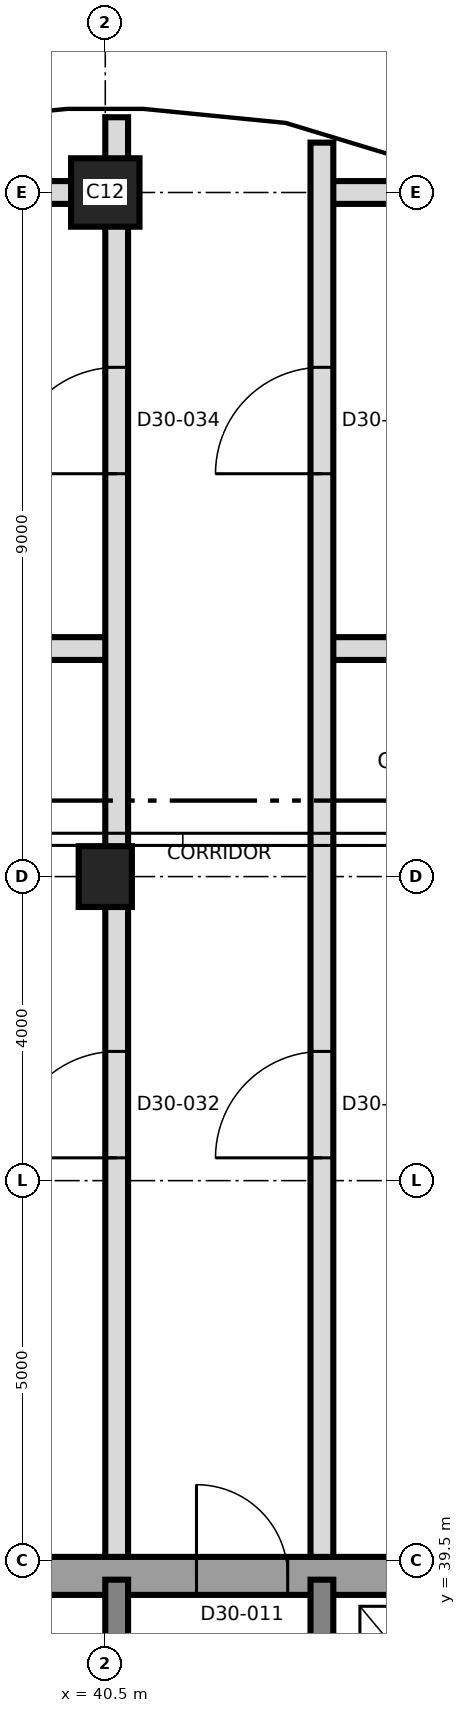
"""IFC4 building model, lengths in metres.
Left out: names, types, materials, properties, quantities, classifications, styles, units other than length and angle.
Written with IfcOpenShell. Run it as: python <this file> out.ifc"""

import sys

from ifc_helpers import new_model, si_unit, direction, frame, frame_2d, origin, origin_2d, place, context, subcontext, project, spatial, rectangle, extrude, element, fill, save


model = new_model("IFC4")
c1 = context("Model", 3, precision=1e-05, world=origin(), true_north=direction((0.0, 1.0)))
c2 = subcontext(c1, "Body", "Model", "MODEL_VIEW")
j1 = project(units=[si_unit("LENGTHUNIT", "METRE"), si_unit("PLANEANGLEUNIT", "RADIAN")], contexts=[c1])
p1 = place(None, origin())
s1 = spatial("IfcSite", under=j1, at=p1, CompositionType="ELEMENT")
p2 = place(p1, origin())
s2 = spatial("IfcBuilding", under=s1, at=p2, CompositionType="ELEMENT")
p3 = place(p2, frame((0.0, 0.0, 260.9)))
s3 = spatial("IfcBuildingStorey", under=s2, at=p3, CompositionType="ELEMENT", Elevation=260.9)
p4 = place(p3, frame((31.25, 39.3, 0.0), z_axis=(0.0, 0.0, 1.0), x_axis=(1.0, 0.0, 0.0)))
e1 = element("IfcWall", 1, at=p4, inside=s3, PredefinedType="SHEAR", context=c2, shape_type="SweptSolid", body=[
    extrude(rectangle(XDim=27.0, YDim=0.5, at=frame_2d((13.5, 0.0))), origin(), (0.0, 0.0, 1.0), 6.0),
])
p5 = place(p4, frame((10.45, 0.0, 0.0)))
e2 = element("IfcOpeningElement", 2, at=p5, cuts=e1, PredefinedType="OPENING", context=c2, shape_type="SweptSolid", body=[
    extrude(rectangle(XDim=1.2, YDim=2.1, at=frame_2d((0.6, 1.05))), frame((0.0, 0.26, 0.0), z_axis=(0.0, -1.0, 0.0), x_axis=(1.0, 0.0, 0.0)), (0.0, 0.0, 1.0), 0.52),
])
for number, where, z_axis, x_axis in (
    (3, (40.65, 33.5, 0.0), (0.0, 0.0, 1.0), (0.0, 1.0, 0.0)),
    (4, (43.35, 33.5, 0.0), (0.0, 0.0, 1.0), (0.0, 1.0, 0.0)),
):
    element("IfcWall", number, at=place(p3, frame(where, z_axis=z_axis, x_axis=x_axis)), inside=s3, PredefinedType="SHEAR", context=c2, shape_type="SweptSolid", body=[
        extrude(rectangle(XDim=5.75, YDim=0.3, at=frame_2d((2.875, 0.0))), origin(), (0.0, 0.0, 1.0), 6.0),
    ])
p6 = place(p3, frame((40.5, 48.5, 0.0), z_axis=(0.0, 0.0, 1.0), x_axis=(0.0, 1.0, 0.0)))
e5 = element("IfcColumn", 5, at=p6, inside=s3, PredefinedType="COLUMN", context=c2, shape_type="SweptSolid", body=[
    extrude(rectangle(XDim=0.8, YDim=0.7, at=origin_2d()), origin(), (0.0, 0.0, 1.0), 6.0),
])
p7 = place(p3, frame((40.5, 57.5, 0.0), z_axis=(0.0, 0.0, 1.0), x_axis=(1.0, 0.0, 0.0)))
e6 = element("IfcColumn", 6, at=p7, inside=s3, PredefinedType="COLUMN", context=c2, shape_type="SweptSolid", body=[
    extrude(rectangle(XDim=0.9, YDim=0.9, at=origin_2d()), origin(), (0.0, 0.0, 1.0), 6.0),
])
p8 = place(p3, frame((30.889, 51.5, 0.0), z_axis=(0.0, 0.0, 1.0), x_axis=(1.0, 0.0, 0.0)))
e7 = element("IfcWall", 7, at=p8, inside=s3, PredefinedType="PARTITIONING", context=c2, shape_type="SweptSolid", body=[
    extrude(rectangle(XDim=9.761, YDim=0.3, at=frame_2d((4.88, 0.0))), origin(), (0.0, 0.0, 1.0), 5.65),
])
p9 = place(p3, frame((43.35, 51.5, 0.0), z_axis=(0.0, 0.0, 1.0), x_axis=(1.0, 0.0, 0.0)))
e8 = element("IfcWall", 8, at=p9, inside=s3, PredefinedType="PARTITIONING", context=c2, shape_type="SweptSolid", body=[
    extrude(rectangle(XDim=6.761, YDim=0.3, at=frame_2d((3.38, 0.0))), origin(), (0.0, 0.0, 1.0), 5.65),
])
p10 = place(p3, frame((35.858, 57.5, 0.0), z_axis=(0.0, 0.0, 1.0), x_axis=(1.0, 0.0, 0.0)))
e9 = element("IfcWall", 9, at=p10, inside=s3, PredefinedType="PARTITIONING", context=c2, shape_type="SweptSolid", body=[
    extrude(rectangle(XDim=4.792, YDim=0.3, at=frame_2d((2.396, 0.0))), origin(), (0.0, 0.0, 1.0), 5.65),
])
p11 = place(p3, frame((43.35, 57.5, 0.0), z_axis=(0.0, 0.0, 1.0), x_axis=(1.0, 0.0, 0.0)))
e10 = element("IfcWall", 10, at=p11, inside=s3, PredefinedType="PARTITIONING", context=c2, shape_type="SweptSolid", body=[
    extrude(rectangle(XDim=1.792, YDim=0.3, at=frame_2d((0.896, 0.0))), origin(), (0.0, 0.0, 1.0), 5.65),
])
p12 = place(p3, frame((40.65, 39.55, 0.0), z_axis=(0.0, 0.0, 1.0), x_axis=(0.0, 1.0, 0.0)))
e11 = element("IfcWall", 11, at=p12, inside=s3, PredefinedType="PARTITIONING", context=c2, shape_type="SweptSolid", body=[
    extrude(rectangle(XDim=18.94, YDim=0.3, at=frame_2d((9.47, 0.0))), origin(), (0.0, 0.0, 1.0), 5.65),
])
p13 = place(p12, frame((5.25, 0.0, 0.0)))
e12 = element("IfcOpeningElement", 12, at=p13, cuts=e11, PredefinedType="OPENING", context=c2, shape_type="SweptSolid", body=[
    extrude(rectangle(XDim=1.4, YDim=2.1, at=frame_2d((0.7, 1.05))), frame((0.0, 0.16, 0.0), z_axis=(0.0, -1.0, 0.0), x_axis=(1.0, 0.0, 0.0)), (0.0, 0.0, 1.0), 0.32),
])
p14 = place(p12, frame((14.25, 0.0, 0.0)))
e13 = element("IfcOpeningElement", 13, at=p14, cuts=e11, PredefinedType="OPENING", context=c2, shape_type="SweptSolid", body=[
    extrude(rectangle(XDim=1.4, YDim=2.1, at=frame_2d((0.7, 1.05))), frame((0.0, 0.16, 0.0), z_axis=(0.0, -1.0, 0.0), x_axis=(1.0, 0.0, 0.0)), (0.0, 0.0, 1.0), 0.32),
])
p15 = place(p3, frame((43.35, 39.55, 0.0), z_axis=(0.0, 0.0, 1.0), x_axis=(0.0, 1.0, 0.0)))
e14 = element("IfcWall", 14, at=p15, inside=s3, PredefinedType="PARTITIONING", context=c2, shape_type="SweptSolid", body=[
    extrude(rectangle(XDim=18.606, YDim=0.3, at=frame_2d((9.303, 0.0))), origin(), (0.0, 0.0, 1.0), 5.65),
])
p16 = place(p15, frame((5.25, 0.0, 0.0)))
e15 = element("IfcOpeningElement", 15, at=p16, cuts=e14, PredefinedType="OPENING", context=c2, shape_type="SweptSolid", body=[
    extrude(rectangle(XDim=1.4, YDim=2.1, at=frame_2d((0.7, 1.05))), frame((0.0, 0.16, 0.0), z_axis=(0.0, -1.0, 0.0), x_axis=(1.0, 0.0, 0.0)), (0.0, 0.0, 1.0), 0.32),
])
p17 = place(p15, frame((14.25, 0.0, 0.0)))
e16 = element("IfcOpeningElement", 16, at=p17, cuts=e14, PredefinedType="OPENING", context=c2, shape_type="SweptSolid", body=[
    extrude(rectangle(XDim=1.4, YDim=2.1, at=frame_2d((0.7, 1.05))), frame((0.0, 0.16, 0.0), z_axis=(0.0, -1.0, 0.0), x_axis=(1.0, 0.0, 0.0)), (0.0, 0.0, 1.0), 0.32),
])
p18 = place(p5, origin())
e17 = element("IfcDoor", 17, at=p18, inside=s3, OperationType="SINGLE_SWING_RIGHT", PredefinedType="DOOR", context=c2, shape_type="SweptSolid", body=[
    extrude(rectangle(XDim=1.2, YDim=2.1, at=frame_2d((0.6, 1.05))), frame((0.0, 0.025, 0.0), z_axis=(0.0, -1.0, 0.0), x_axis=(1.0, 0.0, 0.0)), (0.0, 0.0, 1.0), 0.05),
])
fill(e2, e17)
p19 = place(p16, origin())
e18 = element("IfcDoor", 18, at=p19, inside=s3, OperationType="SINGLE_SWING_LEFT", PredefinedType="DOOR", context=c2, shape_type="SweptSolid", body=[
    extrude(rectangle(XDim=1.4, YDim=2.1, at=frame_2d((0.7, 1.05))), frame((0.0, 0.025, 0.0), z_axis=(0.0, -1.0, 0.0), x_axis=(1.0, 0.0, 0.0)), (0.0, 0.0, 1.0), 0.05),
])
fill(e15, e18)
p20 = place(p13, origin())
e19 = element("IfcDoor", 19, at=p20, inside=s3, OperationType="SINGLE_SWING_LEFT", PredefinedType="DOOR", context=c2, shape_type="SweptSolid", body=[
    extrude(rectangle(XDim=1.4, YDim=2.1, at=frame_2d((0.7, 1.05))), frame((0.0, 0.025, 0.0), z_axis=(0.0, -1.0, 0.0), x_axis=(1.0, 0.0, 0.0)), (0.0, 0.0, 1.0), 0.05),
])
fill(e12, e19)
p21 = place(p17, origin())
e20 = element("IfcDoor", 20, at=p21, inside=s3, OperationType="SINGLE_SWING_LEFT", PredefinedType="DOOR", context=c2, shape_type="SweptSolid", body=[
    extrude(rectangle(XDim=1.4, YDim=2.1, at=frame_2d((0.7, 1.05))), frame((0.0, 0.025, 0.0), z_axis=(0.0, -1.0, 0.0), x_axis=(1.0, 0.0, 0.0)), (0.0, 0.0, 1.0), 0.05),
])
fill(e16, e20)
p22 = place(p14, origin())
e21 = element("IfcDoor", 21, at=p22, inside=s3, OperationType="SINGLE_SWING_LEFT", PredefinedType="DOOR", context=c2, shape_type="SweptSolid", body=[
    extrude(rectangle(XDim=1.4, YDim=2.1, at=frame_2d((0.7, 1.05))), frame((0.0, 0.025, 0.0), z_axis=(0.0, -1.0, 0.0), x_axis=(1.0, 0.0, 0.0)), (0.0, 0.0, 1.0), 0.05),
])
fill(e13, e21)
save(model, sys.argv[1])
